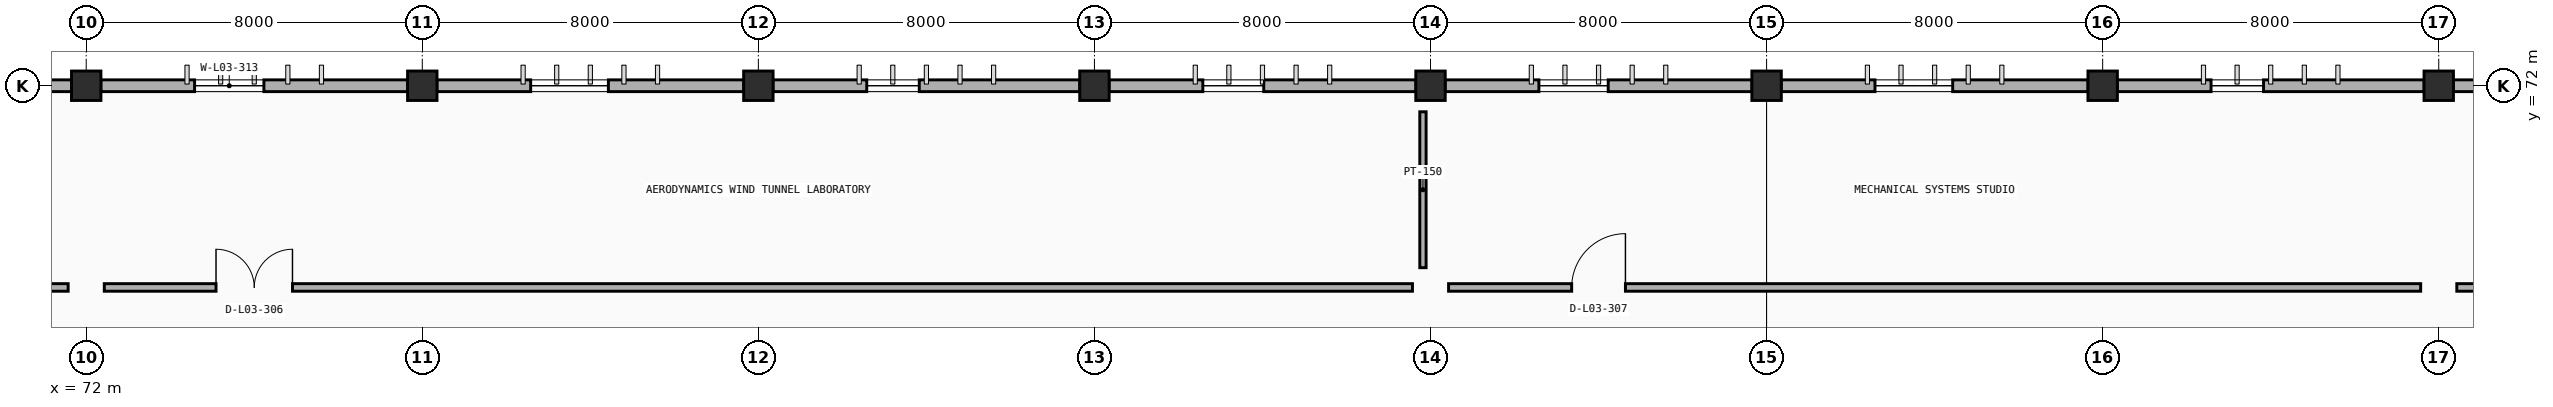
"""IFC4 building model, lengths in metres.
Left out: names, types, materials, properties, quantities, classifications, styles, units other than length and angle.
Written with IfcOpenShell. Run it as: python <this file> out.ifc"""

import sys

from ifc_helpers import new_model, si_unit, direction, frame, frame_2d, origin, origin_2d, place, context, subcontext, project, spatial, rectangle, extrude, element, fill, save


model = new_model("IFC4")
c1 = context("Model", 3, precision=1e-05, world=origin(), true_north=direction((0.0, 1.0)))
c2 = subcontext(c1, "Body", "Model", "MODEL_VIEW")
j1 = project(units=[si_unit("LENGTHUNIT", "METRE"), si_unit("PLANEANGLEUNIT", "RADIAN")], contexts=[c1])
p1 = place(None, origin())
s1 = spatial("IfcSite", under=j1, at=p1, CompositionType="ELEMENT")
p2 = place(p1, origin())
s2 = spatial("IfcBuilding", under=s1, at=p2, CompositionType="ELEMENT")
p3 = place(p2, frame((0.0, 0.0, 9.6)))
s3 = spatial("IfcBuildingStorey", under=s2, at=p3, CompositionType="ELEMENT", Elevation=9.6)
for number, where, z_axis, x_axis in (
    (1, (72.0, 72.0, 0.0), (0.0, 0.0, 1.0), (1.0, 0.0, 0.0)),
    (2, (80.0, 72.0, 0.0), (0.0, 0.0, 1.0), (1.0, 0.0, 0.0)),
    (3, (88.0, 72.0, 0.0), (0.0, 0.0, 1.0), (1.0, 0.0, 0.0)),
    (4, (96.0, 72.0, 0.0), (0.0, 0.0, 1.0), (1.0, 0.0, 0.0)),
    (5, (104.0, 72.0, 0.0), (0.0, 0.0, 1.0), (1.0, 0.0, 0.0)),
    (6, (112.0, 72.0, 0.0), (0.0, 0.0, 1.0), (1.0, 0.0, 0.0)),
    (7, (120.0, 72.0, 0.0), (0.0, 0.0, 1.0), (1.0, 0.0, 0.0)),
    (8, (128.0, 72.0, 0.0), (0.0, 0.0, 1.0), (1.0, 0.0, 0.0)),
):
    element("IfcColumn", number, at=place(p3, frame(where, z_axis=z_axis, x_axis=x_axis)), inside=s3, PredefinedType="COLUMN", context=c2, shape_type="SweptSolid", body=[
        extrude(rectangle(XDim=0.7, YDim=0.7, at=origin_2d()), origin(), (0.0, 0.0, 1.0), 4.2),
    ])
p4 = place(p3, frame((64.347, 72.0, 0.0), z_axis=(0.0, 0.0, 1.0), x_axis=(1.0, 0.0, 0.0)))
e9 = element("IfcWall", 9, at=p4, inside=s3, PredefinedType="STANDARD", context=c2, shape_type="SweptSolid", body=[
    extrude(rectangle(XDim=7.306, YDim=0.28, at=frame_2d((3.653, 0.0))), origin(), (0.0, 0.0, 1.0), 3.325),
])
p5 = place(p4, frame((2.233, 0.0, 0.9)))
e10 = element("IfcOpeningElement", 10, at=p5, cuts=e9, PredefinedType="OPENING", context=c2, shape_type="SweptSolid", body=[
    extrude(rectangle(XDim=1.45, YDim=2.0, at=frame_2d((0.725, 1.0))), frame((0.0, 0.15, 0.0), z_axis=(0.0, -1.0, 0.0), x_axis=(1.0, 0.0, 0.0)), (0.0, 0.0, 1.0), 0.3),
])
p6 = place(p3, frame((72.347, 72.0, 0.0), z_axis=(0.0, 0.0, 1.0), x_axis=(1.0, 0.0, 0.0)))
e11 = element("IfcWall", 11, at=p6, inside=s3, PredefinedType="STANDARD", context=c2, shape_type="SweptSolid", body=[
    extrude(rectangle(XDim=7.306, YDim=0.28, at=frame_2d((3.653, 0.0))), origin(), (0.0, 0.0, 1.0), 3.325),
])
p7 = place(p6, frame((2.233, 0.0, 0.9)))
e12 = element("IfcOpeningElement", 12, at=p7, cuts=e11, PredefinedType="OPENING", context=c2, shape_type="SweptSolid", body=[
    extrude(rectangle(XDim=1.65, YDim=2.0, at=frame_2d((0.825, 1.0))), frame((0.0, 0.15, 0.0), z_axis=(0.0, -1.0, 0.0), x_axis=(1.0, 0.0, 0.0)), (0.0, 0.0, 1.0), 0.3),
])
p8 = place(p3, frame((80.347, 72.0, 0.0), z_axis=(0.0, 0.0, 1.0), x_axis=(1.0, 0.0, 0.0)))
e13 = element("IfcWall", 13, at=p8, inside=s3, PredefinedType="STANDARD", context=c2, shape_type="SweptSolid", body=[
    extrude(rectangle(XDim=7.306, YDim=0.28, at=frame_2d((3.653, 0.0))), origin(), (0.0, 0.0, 1.0), 3.325),
])
p9 = place(p8, frame((2.233, 0.0, 0.9)))
e14 = element("IfcOpeningElement", 14, at=p9, cuts=e13, PredefinedType="OPENING", context=c2, shape_type="SweptSolid", body=[
    extrude(rectangle(XDim=1.85, YDim=2.0, at=frame_2d((0.925, 1.0))), frame((0.0, 0.15, 0.0), z_axis=(0.0, -1.0, 0.0), x_axis=(1.0, 0.0, 0.0)), (0.0, 0.0, 1.0), 0.3),
])
p10 = place(p3, frame((88.347, 72.0, 0.0), z_axis=(0.0, 0.0, 1.0), x_axis=(1.0, 0.0, 0.0)))
e15 = element("IfcWall", 15, at=p10, inside=s3, PredefinedType="STANDARD", context=c2, shape_type="SweptSolid", body=[
    extrude(rectangle(XDim=7.306, YDim=0.28, at=frame_2d((3.653, 0.0))), origin(), (0.0, 0.0, 1.0), 3.325),
])
p11 = place(p10, frame((2.233, 0.0, 0.9)))
e16 = element("IfcOpeningElement", 16, at=p11, cuts=e15, PredefinedType="OPENING", context=c2, shape_type="SweptSolid", body=[
    extrude(rectangle(XDim=1.25, YDim=2.0, at=frame_2d((0.625, 1.0))), frame((0.0, 0.15, 0.0), z_axis=(0.0, -1.0, 0.0), x_axis=(1.0, 0.0, 0.0)), (0.0, 0.0, 1.0), 0.3),
])
p12 = place(p3, frame((96.347, 72.0, 0.0), z_axis=(0.0, 0.0, 1.0), x_axis=(1.0, 0.0, 0.0)))
e17 = element("IfcWall", 17, at=p12, inside=s3, PredefinedType="STANDARD", context=c2, shape_type="SweptSolid", body=[
    extrude(rectangle(XDim=7.306, YDim=0.28, at=frame_2d((3.653, 0.0))), origin(), (0.0, 0.0, 1.0), 3.325),
])
p13 = place(p12, frame((2.233, 0.0, 0.9)))
e18 = element("IfcOpeningElement", 18, at=p13, cuts=e17, PredefinedType="OPENING", context=c2, shape_type="SweptSolid", body=[
    extrude(rectangle(XDim=1.45, YDim=2.0, at=frame_2d((0.725, 1.0))), frame((0.0, 0.15, 0.0), z_axis=(0.0, -1.0, 0.0), x_axis=(1.0, 0.0, 0.0)), (0.0, 0.0, 1.0), 0.3),
])
p14 = place(p3, frame((104.347, 72.0, 0.0), z_axis=(0.0, 0.0, 1.0), x_axis=(1.0, 0.0, 0.0)))
e19 = element("IfcWall", 19, at=p14, inside=s3, PredefinedType="STANDARD", context=c2, shape_type="SweptSolid", body=[
    extrude(rectangle(XDim=7.306, YDim=0.28, at=frame_2d((3.653, 0.0))), origin(), (0.0, 0.0, 1.0), 3.325),
])
p15 = place(p14, frame((2.233, 0.0, 0.9)))
e20 = element("IfcOpeningElement", 20, at=p15, cuts=e19, PredefinedType="OPENING", context=c2, shape_type="SweptSolid", body=[
    extrude(rectangle(XDim=1.65, YDim=2.0, at=frame_2d((0.825, 1.0))), frame((0.0, 0.15, 0.0), z_axis=(0.0, -1.0, 0.0), x_axis=(1.0, 0.0, 0.0)), (0.0, 0.0, 1.0), 0.3),
])
p16 = place(p3, frame((112.347, 72.0, 0.0), z_axis=(0.0, 0.0, 1.0), x_axis=(1.0, 0.0, 0.0)))
e21 = element("IfcWall", 21, at=p16, inside=s3, PredefinedType="STANDARD", context=c2, shape_type="SweptSolid", body=[
    extrude(rectangle(XDim=7.306, YDim=0.28, at=frame_2d((3.653, 0.0))), origin(), (0.0, 0.0, 1.0), 3.325),
])
p17 = place(p16, frame((2.233, 0.0, 0.9)))
e22 = element("IfcOpeningElement", 22, at=p17, cuts=e21, PredefinedType="OPENING", context=c2, shape_type="SweptSolid", body=[
    extrude(rectangle(XDim=1.85, YDim=2.0, at=frame_2d((0.925, 1.0))), frame((0.0, 0.15, 0.0), z_axis=(0.0, -1.0, 0.0), x_axis=(1.0, 0.0, 0.0)), (0.0, 0.0, 1.0), 0.3),
])
p18 = place(p3, frame((120.347, 72.0, 0.0), z_axis=(0.0, 0.0, 1.0), x_axis=(1.0, 0.0, 0.0)))
e23 = element("IfcWall", 23, at=p18, inside=s3, PredefinedType="STANDARD", context=c2, shape_type="SweptSolid", body=[
    extrude(rectangle(XDim=7.306, YDim=0.28, at=frame_2d((3.653, 0.0))), origin(), (0.0, 0.0, 1.0), 3.325),
])
p19 = place(p18, frame((2.233, 0.0, 0.9)))
e24 = element("IfcOpeningElement", 24, at=p19, cuts=e23, PredefinedType="OPENING", context=c2, shape_type="SweptSolid", body=[
    extrude(rectangle(XDim=1.25, YDim=2.0, at=frame_2d((0.625, 1.0))), frame((0.0, 0.15, 0.0), z_axis=(0.0, -1.0, 0.0), x_axis=(1.0, 0.0, 0.0)), (0.0, 0.0, 1.0), 0.3),
])
p20 = place(p3, frame((128.347, 72.0, 0.0), z_axis=(0.0, 0.0, 1.0), x_axis=(1.0, 0.0, 0.0)))
e25 = element("IfcWall", 25, at=p20, inside=s3, PredefinedType="STANDARD", context=c2, shape_type="SweptSolid", body=[
    extrude(rectangle(XDim=7.306, YDim=0.28, at=frame_2d((3.653, 0.0))), origin(), (0.0, 0.0, 1.0), 3.325),
])
p21 = place(p20, frame((2.233, 0.0, 0.9)))
e26 = element("IfcOpeningElement", 26, at=p21, cuts=e25, PredefinedType="OPENING", context=c2, shape_type="SweptSolid", body=[
    extrude(rectangle(XDim=1.45, YDim=2.0, at=frame_2d((0.725, 1.0))), frame((0.0, 0.15, 0.0), z_axis=(0.0, -1.0, 0.0), x_axis=(1.0, 0.0, 0.0)), (0.0, 0.0, 1.0), 0.3),
])
p22 = place(p3, frame((56.43, 67.2, 0.0), z_axis=(0.0, 0.0, 1.0), x_axis=(1.0, 0.0, 0.0)))
e27 = element("IfcWall", 27, at=p22, inside=s3, PredefinedType="PARTITIONING", context=c2, shape_type="SweptSolid", body=[
    extrude(rectangle(XDim=15.14, YDim=0.18, at=frame_2d((7.57, 0.0))), origin(), (0.0, 0.0, 1.0), 3.3),
])
p23 = place(p22, frame((3.0, 0.0, 0.0)))
e28 = element("IfcOpeningElement", 28, at=p23, cuts=e27, PredefinedType="OPENING", context=c2, shape_type="SweptSolid", body=[
    extrude(rectangle(XDim=1.14, YDim=2.15, at=frame_2d((0.57, 1.075))), frame((0.0, 0.1, 0.0), z_axis=(0.0, -1.0, 0.0), x_axis=(1.0, 0.0, 0.0)), (0.0, 0.0, 1.0), 0.2),
])
p24 = place(p3, frame((72.43, 67.2, 0.0), z_axis=(0.0, 0.0, 1.0), x_axis=(1.0, 0.0, 0.0)))
e29 = element("IfcWall", 29, at=p24, inside=s3, PredefinedType="PARTITIONING", context=c2, shape_type="SweptSolid", body=[
    extrude(rectangle(XDim=31.14, YDim=0.18, at=frame_2d((15.57, 0.0))), origin(), (0.0, 0.0, 1.0), 3.3),
])
p25 = place(p24, frame((2.66, 0.0, 0.0)))
e30 = element("IfcOpeningElement", 30, at=p25, cuts=e29, PredefinedType="OPENING", context=c2, shape_type="SweptSolid", body=[
    extrude(rectangle(XDim=1.82, YDim=2.25, at=frame_2d((0.91, 1.125))), frame((0.0, 0.1, 0.0), z_axis=(0.0, -1.0, 0.0), x_axis=(1.0, 0.0, 0.0)), (0.0, 0.0, 1.0), 0.2),
])
p26 = place(p3, frame((103.82, 67.67, 0.0), z_axis=(0.0, 0.0, 1.0), x_axis=(0.0, 1.0, 0.0)))
e31 = element("IfcWall", 31, at=p26, inside=s3, PredefinedType="PARTITIONING", context=c2, shape_type="SweptSolid", body=[
    extrude(rectangle(XDim=3.71, YDim=0.15, at=frame_2d((1.855, 0.0))), origin(), (0.0, 0.0, 1.0), 3.225),
])
p27 = place(p3, frame((104.43, 67.2, 0.0), z_axis=(0.0, 0.0, 1.0), x_axis=(1.0, 0.0, 0.0)))
e32 = element("IfcWall", 32, at=p27, inside=s3, PredefinedType="PARTITIONING", context=c2, shape_type="SweptSolid", body=[
    extrude(rectangle(XDim=23.14, YDim=0.18, at=frame_2d((11.57, 0.0))), origin(), (0.0, 0.0, 1.0), 3.3),
])
p28 = place(p27, frame((2.93, 0.0, 0.0)))
e33 = element("IfcOpeningElement", 33, at=p28, cuts=e32, PredefinedType="OPENING", context=c2, shape_type="SweptSolid", body=[
    extrude(rectangle(XDim=1.28, YDim=2.2, at=frame_2d((0.64, 1.1))), frame((0.0, 0.1, 0.0), z_axis=(0.0, -1.0, 0.0), x_axis=(1.0, 0.0, 0.0)), (0.0, 0.0, 1.0), 0.2),
])
p29 = place(p3, frame((128.43, 67.2, 0.0), z_axis=(0.0, 0.0, 1.0), x_axis=(1.0, 0.0, 0.0)))
e34 = element("IfcWall", 34, at=p29, inside=s3, PredefinedType="PARTITIONING", context=c2, shape_type="SweptSolid", body=[
    extrude(rectangle(XDim=23.14, YDim=0.18, at=frame_2d((11.57, 0.0))), origin(), (0.0, 0.0, 1.0), 3.3),
])
p30 = place(p29, frame((2.995, 0.0, 0.0)))
e35 = element("IfcOpeningElement", 35, at=p30, cuts=e34, PredefinedType="OPENING", context=c2, shape_type="SweptSolid", body=[
    extrude(rectangle(XDim=1.15, YDim=2.15, at=frame_2d((0.575, 1.075))), frame((0.0, 0.1, 0.0), z_axis=(0.0, -1.0, 0.0), x_axis=(1.0, 0.0, 0.0)), (0.0, 0.0, 1.0), 0.2),
])
p31 = place(p7, origin())
e36 = element("IfcWindow", 36, at=p31, inside=s3, PartitioningType="DOUBLE_PANEL_VERTICAL", PredefinedType="WINDOW", context=c2, shape_type="SweptSolid", body=[
    extrude(rectangle(XDim=1.65, YDim=2.0, at=frame_2d((0.825, 1.0))), frame((0.0, 0.03, 0.0), z_axis=(0.0, -1.0, 0.0), x_axis=(1.0, 0.0, 0.0)), (0.0, 0.0, 1.0), 0.06),
])
fill(e12, e36)
p32 = place(p9, origin())
e37 = element("IfcWindow", 37, at=p32, inside=s3, PartitioningType="DOUBLE_PANEL_VERTICAL", PredefinedType="WINDOW", context=c2, shape_type="SweptSolid", body=[
    extrude(rectangle(XDim=1.85, YDim=2.0, at=frame_2d((0.925, 1.0))), frame((0.0, 0.03, 0.0), z_axis=(0.0, -1.0, 0.0), x_axis=(1.0, 0.0, 0.0)), (0.0, 0.0, 1.0), 0.06),
])
fill(e14, e37)
p33 = place(p11, origin())
e38 = element("IfcWindow", 38, at=p33, inside=s3, PartitioningType="SINGLE_PANEL", PredefinedType="WINDOW", context=c2, shape_type="SweptSolid", body=[
    extrude(rectangle(XDim=1.25, YDim=2.0, at=frame_2d((0.625, 1.0))), frame((0.0, 0.03, 0.0), z_axis=(0.0, -1.0, 0.0), x_axis=(1.0, 0.0, 0.0)), (0.0, 0.0, 1.0), 0.06),
])
fill(e16, e38)
p34 = place(p13, origin())
e39 = element("IfcWindow", 39, at=p34, inside=s3, PartitioningType="SINGLE_PANEL", PredefinedType="WINDOW", context=c2, shape_type="SweptSolid", body=[
    extrude(rectangle(XDim=1.45, YDim=2.0, at=frame_2d((0.725, 1.0))), frame((0.0, 0.03, 0.0), z_axis=(0.0, -1.0, 0.0), x_axis=(1.0, 0.0, 0.0)), (0.0, 0.0, 1.0), 0.06),
])
fill(e18, e39)
p35 = place(p15, origin())
e40 = element("IfcWindow", 40, at=p35, inside=s3, PartitioningType="DOUBLE_PANEL_VERTICAL", PredefinedType="WINDOW", context=c2, shape_type="SweptSolid", body=[
    extrude(rectangle(XDim=1.65, YDim=2.0, at=frame_2d((0.825, 1.0))), frame((0.0, 0.03, 0.0), z_axis=(0.0, -1.0, 0.0), x_axis=(1.0, 0.0, 0.0)), (0.0, 0.0, 1.0), 0.06),
])
fill(e20, e40)
p36 = place(p17, origin())
e41 = element("IfcWindow", 41, at=p36, inside=s3, PartitioningType="DOUBLE_PANEL_VERTICAL", PredefinedType="WINDOW", context=c2, shape_type="SweptSolid", body=[
    extrude(rectangle(XDim=1.85, YDim=2.0, at=frame_2d((0.925, 1.0))), frame((0.0, 0.03, 0.0), z_axis=(0.0, -1.0, 0.0), x_axis=(1.0, 0.0, 0.0)), (0.0, 0.0, 1.0), 0.06),
])
fill(e22, e41)
p37 = place(p19, origin())
e42 = element("IfcWindow", 42, at=p37, inside=s3, PartitioningType="SINGLE_PANEL", PredefinedType="WINDOW", context=c2, shape_type="SweptSolid", body=[
    extrude(rectangle(XDim=1.25, YDim=2.0, at=frame_2d((0.625, 1.0))), frame((0.0, 0.03, 0.0), z_axis=(0.0, -1.0, 0.0), x_axis=(1.0, 0.0, 0.0)), (0.0, 0.0, 1.0), 0.06),
])
fill(e24, e42)
p38 = place(p25, origin())
e43 = element("IfcDoor", 43, at=p38, inside=s3, OperationType="DOUBLE_DOOR_SINGLE_SWING", PredefinedType="DOOR", context=c2, shape_type="SweptSolid", body=[
    extrude(rectangle(XDim=1.82, YDim=2.25, at=frame_2d((0.91, 1.125))), frame((0.0, 0.025, 0.0), z_axis=(0.0, -1.0, 0.0), x_axis=(1.0, 0.0, 0.0)), (0.0, 0.0, 1.0), 0.05),
])
fill(e30, e43)
p39 = place(p28, origin())
e44 = element("IfcDoor", 44, at=p39, inside=s3, OperationType="SINGLE_SWING_RIGHT", PredefinedType="DOOR", context=c2, shape_type="SweptSolid", body=[
    extrude(rectangle(XDim=1.28, YDim=2.2, at=frame_2d((0.64, 1.1))), frame((0.0, 0.025, 0.0), z_axis=(0.0, -1.0, 0.0), x_axis=(1.0, 0.0, 0.0)), (0.0, 0.0, 1.0), 0.05),
])
fill(e33, e44)
save(model, sys.argv[1])
